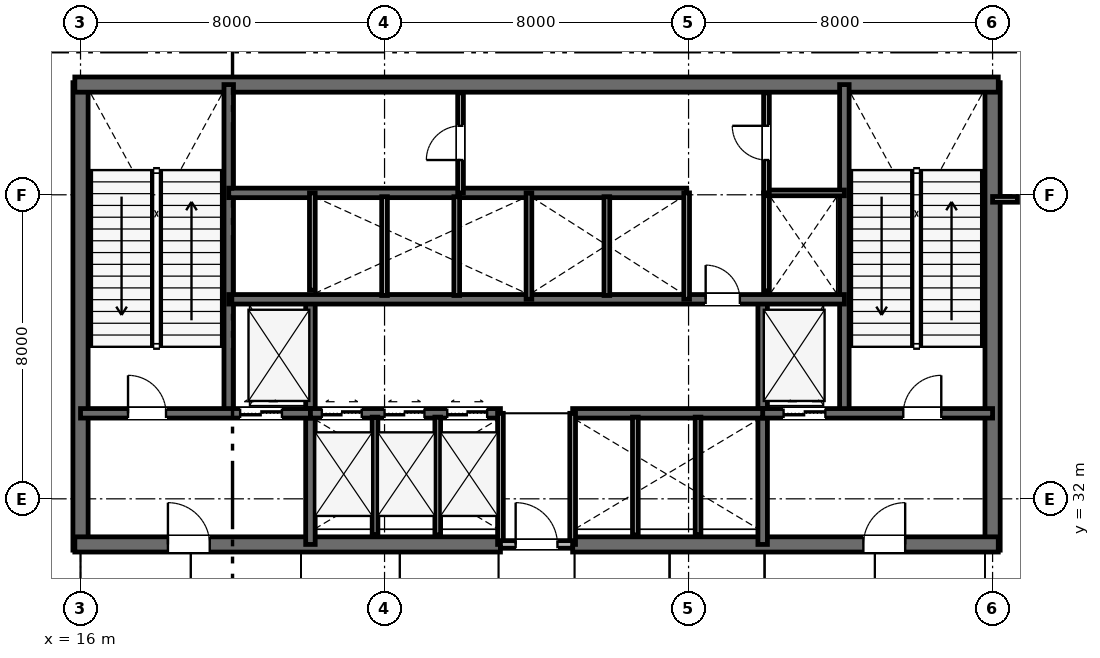
"""IFC4 building model, lengths in metres.
Left out: names, types, materials, properties, quantities, classifications, styles, units other than length and angle.
Written with IfcOpenShell. Run it as: python <this file> out.ifc"""

import sys

from ifc_helpers import new_model, si_unit, direction, frame, frame_2d, origin, place, context, subcontext, project, spatial, rectangle, extrude, element, fill, save


model = new_model("IFC4")
c1 = context("Model", 3, precision=1e-05, world=origin(), true_north=direction((0.0, 1.0)))
c2 = subcontext(c1, "Body", "Model", "MODEL_VIEW")
j1 = project(units=[si_unit("LENGTHUNIT", "METRE"), si_unit("PLANEANGLEUNIT", "RADIAN")], contexts=[c1])
p1 = place(None, origin())
s1 = spatial("IfcSite", under=j1, at=p1, CompositionType="ELEMENT")
p2 = place(p1, origin())
s2 = spatial("IfcBuilding", under=s1, at=p2, CompositionType="ELEMENT")
p3 = place(p2, frame((0.0, 0.0, 6.0)))
s3 = spatial("IfcBuildingStorey", under=s2, at=p3, CompositionType="ELEMENT", Elevation=6.0)
for number, where, z_axis, x_axis in (
    (1, (16.0, 30.65, 0.0), (0.0, 0.0, 1.0), (0.0, 1.0, 0.0)),
    (2, (40.0, 30.65, 0.0), (0.0, 0.0, 1.0), (0.0, 1.0, 0.0)),
):
    element("IfcWall", number, at=place(p3, frame(where, z_axis=z_axis, x_axis=x_axis)), inside=s3, PredefinedType="SHEAR", context=c2, shape_type="SweptSolid", body=[
        extrude(rectangle(XDim=12.3, YDim=0.4, at=frame_2d((6.15, 0.0))), origin(), (0.0, 0.0, 1.0), 5.1),
    ])
p4 = place(p3, frame((15.85, 42.9, 0.0), z_axis=(0.0, 0.0, 1.0), x_axis=(1.0, 0.0, 0.0)))
e3 = element("IfcWall", 3, at=p4, inside=s3, PredefinedType="SHEAR", context=c2, shape_type="SweptSolid", body=[
    extrude(rectangle(XDim=24.3, YDim=0.4, at=frame_2d((12.15, 0.0))), origin(), (0.0, 0.0, 1.0), 5.1),
])
p5 = place(p3, frame((15.85, 30.8, 0.0), z_axis=(0.0, 0.0, 1.0), x_axis=(1.0, 0.0, 0.0)))
e4 = element("IfcWall", 4, at=p5, inside=s3, PredefinedType="SHEAR", context=c2, shape_type="SweptSolid", body=[
    extrude(rectangle(XDim=11.2, YDim=0.4, at=frame_2d((5.6, 0.0))), origin(), (0.0, 0.0, 1.0), 5.1),
])
p6 = place(p5, frame((2.45, 0.0, 0.0)))
e5 = element("IfcOpeningElement", 5, at=p6, cuts=e4, PredefinedType="OPENING", context=c2, shape_type="SweptSolid", body=[
    extrude(rectangle(XDim=1.1, YDim=2.15, at=frame_2d((0.55, 1.075))), frame((0.0, 0.21, 0.0), z_axis=(0.0, -1.0, 0.0), x_axis=(1.0, 0.0, 0.0)), (0.0, 0.0, 1.0), 0.42),
])
p7 = place(p3, frame((28.95, 30.8, 0.0), z_axis=(0.0, 0.0, 1.0), x_axis=(1.0, 0.0, 0.0)))
e6 = element("IfcWall", 6, at=p7, inside=s3, PredefinedType="SHEAR", context=c2, shape_type="SweptSolid", body=[
    extrude(rectangle(XDim=11.2, YDim=0.4, at=frame_2d((5.6, 0.0))), origin(), (0.0, 0.0, 1.0), 5.1),
])
p8 = place(p7, frame((7.65, 0.0, 0.0)))
e7 = element("IfcOpeningElement", 7, at=p8, cuts=e6, PredefinedType="OPENING", context=c2, shape_type="SweptSolid", body=[
    extrude(rectangle(XDim=1.1, YDim=2.15, at=frame_2d((0.55, 1.075))), frame((0.0, 0.21, 0.0), z_axis=(0.0, -1.0, 0.0), x_axis=(1.0, 0.0, 0.0)), (0.0, 0.0, 1.0), 0.42),
])
for number, where, z_axis, x_axis in (
    (8, (19.9, 34.25, 0.0), (0.0, 0.0, 1.0), (0.0, 1.0, 0.0)),
    (9, (36.1, 34.25, 0.0), (0.0, 0.0, 1.0), (0.0, 1.0, 0.0)),
):
    element("IfcWall", number, at=place(p3, frame(where, z_axis=z_axis, x_axis=x_axis)), inside=s3, PredefinedType="SHEAR", context=c2, shape_type="SweptSolid", body=[
        extrude(rectangle(XDim=8.65, YDim=0.25, at=frame_2d((4.325, 0.0))), origin(), (0.0, 0.0, 1.0), 5.1),
    ])
for number, where, z_axis, x_axis in (
    (10, (22.05, 30.8, 0.0), (0.0, 0.0, 1.0), (0.0, 1.0, 0.0)),
    (11, (33.95, 30.8, 0.0), (0.0, 0.0, 1.0), (0.0, 1.0, 0.0)),
):
    element("IfcWall", number, at=place(p3, frame(where, z_axis=z_axis, x_axis=x_axis)), inside=s3, PredefinedType="SHEAR", context=c2, shape_type="SweptSolid", body=[
        extrude(rectangle(XDim=6.45, YDim=0.25, at=frame_2d((3.225, 0.0))), origin(), (0.0, 0.0, 1.0), 5.1),
    ])
p9 = place(p3, frame((16.0, 34.25, 0.0), z_axis=(0.0, 0.0, 1.0), x_axis=(1.0, 0.0, 0.0)))
e12 = element("IfcWall", 12, at=p9, inside=s3, PredefinedType="SHEAR", context=c2, shape_type="SweptSolid", body=[
    extrude(rectangle(XDim=6.05, YDim=0.25, at=frame_2d((3.025, 0.0))), origin(), (0.0, 0.0, 1.0), 5.1),
])
p10 = place(p9, frame((1.25, 0.0, 0.0)))
e13 = element("IfcOpeningElement", 13, at=p10, cuts=e12, PredefinedType="OPENING", context=c2, shape_type="SweptSolid", body=[
    extrude(rectangle(XDim=1.0, YDim=2.15, at=frame_2d((0.5, 1.075))), frame((0.0, 0.135, 0.0), z_axis=(0.0, -1.0, 0.0), x_axis=(1.0, 0.0, 0.0)), (0.0, 0.0, 1.0), 0.27),
])
p11 = place(p9, frame((4.2, 0.0, 0.0)))
e14 = element("IfcOpeningElement", 14, at=p11, cuts=e12, PredefinedType="OPENING", context=c2, shape_type="SweptSolid", body=[
    extrude(rectangle(XDim=1.1, YDim=2.15, at=frame_2d((0.55, 1.075))), frame((0.0, 0.135, 0.0), z_axis=(0.0, -1.0, 0.0), x_axis=(1.0, 0.0, 0.0)), (0.0, 0.0, 1.0), 0.27),
])
p12 = place(p3, frame((33.95, 34.25, 0.0), z_axis=(0.0, 0.0, 1.0), x_axis=(1.0, 0.0, 0.0)))
e15 = element("IfcWall", 15, at=p12, inside=s3, PredefinedType="SHEAR", context=c2, shape_type="SweptSolid", body=[
    extrude(rectangle(XDim=6.05, YDim=0.25, at=frame_2d((3.025, 0.0))), origin(), (0.0, 0.0, 1.0), 5.1),
])
p13 = place(p12, frame((3.7, 0.0, 0.0)))
e16 = element("IfcOpeningElement", 16, at=p13, cuts=e15, PredefinedType="OPENING", context=c2, shape_type="SweptSolid", body=[
    extrude(rectangle(XDim=1.0, YDim=2.15, at=frame_2d((0.5, 1.075))), frame((0.0, 0.135, 0.0), z_axis=(0.0, -1.0, 0.0), x_axis=(1.0, 0.0, 0.0)), (0.0, 0.0, 1.0), 0.27),
])
p14 = place(p12, frame((0.55, 0.0, 0.0)))
e17 = element("IfcOpeningElement", 17, at=p14, cuts=e15, PredefinedType="OPENING", context=c2, shape_type="SweptSolid", body=[
    extrude(rectangle(XDim=1.1, YDim=2.15, at=frame_2d((0.55, 1.075))), frame((0.0, 0.135, 0.0), z_axis=(0.0, -1.0, 0.0), x_axis=(1.0, 0.0, 0.0)), (0.0, 0.0, 1.0), 0.27),
])
p15 = place(p3, frame((22.05, 34.25, 0.0), z_axis=(0.0, 0.0, 1.0), x_axis=(1.0, 0.0, 0.0)))
e18 = element("IfcWall", 18, at=p15, inside=s3, PredefinedType="SHEAR", context=c2, shape_type="SweptSolid", body=[
    extrude(rectangle(XDim=5.0, YDim=0.25, at=frame_2d((2.5, 0.0))), origin(), (0.0, 0.0, 1.0), 5.1),
])
p16 = place(p15, frame((0.3, 0.0, 0.0)))
e19 = element("IfcOpeningElement", 19, at=p16, cuts=e18, PredefinedType="OPENING", context=c2, shape_type="SweptSolid", body=[
    extrude(rectangle(XDim=1.05, YDim=2.15, at=frame_2d((0.525, 1.075))), frame((0.0, 0.135, 0.0), z_axis=(0.0, -1.0, 0.0), x_axis=(1.0, 0.0, 0.0)), (0.0, 0.0, 1.0), 0.27),
])
p17 = place(p15, frame((1.95, 0.0, 0.0)))
e20 = element("IfcOpeningElement", 20, at=p17, cuts=e18, PredefinedType="OPENING", context=c2, shape_type="SweptSolid", body=[
    extrude(rectangle(XDim=1.05, YDim=2.15, at=frame_2d((0.525, 1.075))), frame((0.0, 0.135, 0.0), z_axis=(0.0, -1.0, 0.0), x_axis=(1.0, 0.0, 0.0)), (0.0, 0.0, 1.0), 0.27),
])
p18 = place(p15, frame((3.6, 0.0, 0.0)))
e21 = element("IfcOpeningElement", 21, at=p18, cuts=e18, PredefinedType="OPENING", context=c2, shape_type="SweptSolid", body=[
    extrude(rectangle(XDim=1.05, YDim=2.15, at=frame_2d((0.525, 1.075))), frame((0.0, 0.135, 0.0), z_axis=(0.0, -1.0, 0.0), x_axis=(1.0, 0.0, 0.0)), (0.0, 0.0, 1.0), 0.27),
])
p19 = place(p3, frame((28.95, 34.25, 0.0), z_axis=(0.0, 0.0, 1.0), x_axis=(1.0, 0.0, 0.0)))
e22 = element("IfcWall", 22, at=p19, inside=s3, PredefinedType="SHEAR", context=c2, shape_type="SweptSolid", body=[
    extrude(rectangle(XDim=5.0, YDim=0.25, at=frame_2d((2.5, 0.0))), origin(), (0.0, 0.0, 1.0), 5.1),
])
p20 = place(p3, frame((19.9, 37.25, 0.0), z_axis=(0.0, 0.0, 1.0), x_axis=(1.0, 0.0, 0.0)))
e23 = element("IfcWall", 23, at=p20, inside=s3, PredefinedType="SHEAR", context=c2, shape_type="SweptSolid", body=[
    extrude(rectangle(XDim=16.2, YDim=0.25, at=frame_2d((8.1, 0.0))), origin(), (0.0, 0.0, 1.0), 5.1),
])
p21 = place(p20, frame((12.55, 0.0, 0.0)))
e24 = element("IfcOpeningElement", 24, at=p21, cuts=e23, PredefinedType="OPENING", context=c2, shape_type="SweptSolid", body=[
    extrude(rectangle(XDim=0.9, YDim=2.15, at=frame_2d((0.45, 1.075))), frame((0.0, 0.135, 0.0), z_axis=(0.0, -1.0, 0.0), x_axis=(1.0, 0.0, 0.0)), (0.0, 0.0, 1.0), 0.27),
])
p22 = place(p3, frame((19.9, 40.05, 0.0), z_axis=(0.0, 0.0, 1.0), x_axis=(1.0, 0.0, 0.0)))
e25 = element("IfcWall", 25, at=p22, inside=s3, PredefinedType="SHEAR", context=c2, shape_type="SweptSolid", body=[
    extrude(rectangle(XDim=12.05, YDim=0.25, at=frame_2d((6.025, 0.0))), origin(), (0.0, 0.0, 1.0), 5.1),
])
for number, where, z_axis, x_axis in (
    (26, (27.05, 30.8, 0.0), (0.0, 0.0, 1.0), (0.0, 1.0, 0.0)),
    (27, (28.95, 30.8, 0.0), (0.0, 0.0, 1.0), (0.0, 1.0, 0.0)),
):
    element("IfcWall", number, at=place(p3, frame(where, z_axis=z_axis, x_axis=x_axis)), inside=s3, PredefinedType="PLUMBINGWALL", context=c2, shape_type="SweptSolid", body=[
        extrude(rectangle(XDim=3.45, YDim=0.15, at=frame_2d((1.725, 0.0))), origin(), (0.0, 0.0, 1.0), 4.51),
    ])
p23 = place(p3, frame((27.05, 30.8, 0.0), z_axis=(0.0, 0.0, 1.0), x_axis=(1.0, 0.0, 0.0)))
e28 = element("IfcWall", 28, at=p23, inside=s3, PredefinedType="PARTITIONING", context=c2, shape_type="SweptSolid", body=[
    extrude(rectangle(XDim=1.9, YDim=0.2, at=frame_2d((0.95, 0.0))), origin(), (0.0, 0.0, 1.0), 4.51),
])
p24 = place(p23, frame((0.4, 0.0, 0.0)))
e29 = element("IfcOpeningElement", 29, at=p24, cuts=e28, PredefinedType="OPENING", context=c2, shape_type="SweptSolid", body=[
    extrude(rectangle(XDim=1.1, YDim=2.15, at=frame_2d((0.55, 1.075))), frame((0.0, 0.11, 0.0), z_axis=(0.0, -1.0, 0.0), x_axis=(1.0, 0.0, 0.0)), (0.0, 0.0, 1.0), 0.22),
])
for number, where, z_axis, x_axis in (
    (30, (23.75, 31.05, 0.0), (0.0, 0.0, 1.0), (0.0, 1.0, 0.0)),
    (31, (25.4, 31.05, 0.0), (0.0, 0.0, 1.0), (0.0, 1.0, 0.0)),
    (32, (30.6, 31.05, 0.0), (0.0, 0.0, 1.0), (0.0, 1.0, 0.0)),
    (33, (32.25, 31.05, 0.0), (0.0, 0.0, 1.0), (0.0, 1.0, 0.0)),
):
    element("IfcWall", number, at=place(p3, frame(where, z_axis=z_axis, x_axis=x_axis)), inside=s3, PredefinedType="PLUMBINGWALL", context=c2, shape_type="SweptSolid", body=[
        extrude(rectangle(XDim=3.1, YDim=0.15, at=frame_2d((1.55, 0.0))), origin(), (0.0, 0.0, 1.0), 4.77),
    ])
p25 = place(p3, frame((22.1, 37.49, 0.0), z_axis=(0.0, 0.0, 1.0), x_axis=(0.0, 1.0, 0.0)))
e34 = element("IfcWall", 34, at=p25, inside=s3, PredefinedType="PLUMBINGWALL", context=c2, shape_type="SweptSolid", body=[
    extrude(rectangle(XDim=2.56, YDim=0.15, at=frame_2d((1.28, 0.0))), origin(), (0.0, 0.0, 1.0), 4.77),
])
p26 = place(p3, frame((27.8, 37.25, 0.0), z_axis=(0.0, 0.0, 1.0), x_axis=(0.0, 1.0, 0.0)))
e35 = element("IfcWall", 35, at=p26, inside=s3, PredefinedType="PLUMBINGWALL", context=c2, shape_type="SweptSolid", body=[
    extrude(rectangle(XDim=2.8, YDim=0.15, at=frame_2d((1.4, 0.0))), origin(), (0.0, 0.0, 1.0), 4.77),
])
for number, where, z_axis, x_axis in (
    (36, (24.0, 37.35, 0.0), (0.0, 0.0, 1.0), (0.0, 1.0, 0.0)),
    (37, (25.9, 37.35, 0.0), (0.0, 0.0, 1.0), (0.0, 1.0, 0.0)),
):
    element("IfcWall", number, at=place(p3, frame(where, z_axis=z_axis, x_axis=x_axis)), inside=s3, PredefinedType="PLUMBINGWALL", context=c2, shape_type="SweptSolid", body=[
        extrude(rectangle(XDim=2.6, YDim=0.15, at=frame_2d((1.3, 0.0))), origin(), (0.0, 0.0, 1.0), 4.77),
    ])
p27 = place(p3, frame((31.95, 37.25, 0.0), z_axis=(0.0, 0.0, 1.0), x_axis=(0.0, 1.0, 0.0)))
e38 = element("IfcWall", 38, at=p27, inside=s3, PredefinedType="PLUMBINGWALL", context=c2, shape_type="SweptSolid", body=[
    extrude(rectangle(XDim=2.8, YDim=0.15, at=frame_2d((1.4, 0.0))), origin(), (0.0, 0.0, 1.0), 4.77),
])
p28 = place(p3, frame((29.85, 37.35, 0.0), z_axis=(0.0, 0.0, 1.0), x_axis=(0.0, 1.0, 0.0)))
e39 = element("IfcWall", 39, at=p28, inside=s3, PredefinedType="PLUMBINGWALL", context=c2, shape_type="SweptSolid", body=[
    extrude(rectangle(XDim=2.6, YDim=0.15, at=frame_2d((1.3, 0.0))), origin(), (0.0, 0.0, 1.0), 4.77),
])
p29 = place(p3, frame((34.05, 37.473, 0.0), z_axis=(0.0, 0.0, 1.0), x_axis=(0.0, 1.0, 0.0)))
e40 = element("IfcWall", 40, at=p29, inside=s3, PredefinedType="PLUMBINGWALL", context=c2, shape_type="SweptSolid", body=[
    extrude(rectangle(XDim=2.577, YDim=0.15, at=frame_2d((1.288, 0.0))), origin(), (0.0, 0.0, 1.0), 4.77),
])
p30 = place(p3, frame((34.05, 40.05, 0.0), z_axis=(0.0, 0.0, 1.0), x_axis=(1.0, 0.0, 0.0)))
e41 = element("IfcWall", 41, at=p30, inside=s3, PredefinedType="PARTITIONING", context=c2, shape_type="SweptSolid", body=[
    extrude(rectangle(XDim=2.05, YDim=0.15, at=frame_2d((1.025, 0.0))), origin(), (0.0, 0.0, 1.0), 4.77),
])
p31 = place(p3, frame((34.05, 40.05, 0.0), z_axis=(0.0, 0.0, 1.0), x_axis=(0.0, 1.0, 0.0)))
e42 = element("IfcWall", 42, at=p31, inside=s3, PredefinedType="PARTITIONING", context=c2, shape_type="SweptSolid", body=[
    extrude(rectangle(XDim=2.63, YDim=0.15, at=frame_2d((1.315, 0.0))), origin(), (0.0, 0.0, 1.0), 4.77),
])
p32 = place(p31, frame((0.865, 0.0, 0.0)))
e43 = element("IfcOpeningElement", 43, at=p32, cuts=e42, PredefinedType="OPENING", context=c2, shape_type="SweptSolid", body=[
    extrude(rectangle(XDim=0.9, YDim=2.15, at=frame_2d((0.45, 1.075))), frame((0.0, 0.085, 0.0), z_axis=(0.0, -1.0, 0.0), x_axis=(1.0, 0.0, 0.0)), (0.0, 0.0, 1.0), 0.17),
])
p33 = place(p3, frame((26.0, 40.05, 0.0), z_axis=(0.0, 0.0, 1.0), x_axis=(0.0, 1.0, 0.0)))
e44 = element("IfcWall", 44, at=p33, inside=s3, PredefinedType="PARTITIONING", context=c2, shape_type="SweptSolid", body=[
    extrude(rectangle(XDim=2.63, YDim=0.15, at=frame_2d((1.315, 0.0))), origin(), (0.0, 0.0, 1.0), 4.77),
])
p34 = place(p33, frame((0.865, 0.0, 0.0)))
e45 = element("IfcOpeningElement", 45, at=p34, cuts=e44, PredefinedType="OPENING", context=c2, shape_type="SweptSolid", body=[
    extrude(rectangle(XDim=0.9, YDim=2.15, at=frame_2d((0.45, 1.075))), frame((0.0, 0.085, 0.0), z_axis=(0.0, -1.0, 0.0), x_axis=(1.0, 0.0, 0.0)), (0.0, 0.0, 1.0), 0.17),
])
p35 = place(p3, frame((40.0, 39.88, 0.0), z_axis=(0.0, 0.0, 1.0), x_axis=(1.0, 0.0, 0.0)))
e46 = element("IfcWall", 46, at=p35, inside=s3, PredefinedType="PARTITIONING", context=c2, shape_type="SweptSolid", body=[
    extrude(rectangle(XDim=0.655, YDim=0.15, at=frame_2d((0.328, 0.0))), origin(), (0.0, 0.0, 1.0), 4.77),
])
p36 = place(p24, origin())
e47 = element("IfcDoor", 47, at=p36, inside=s3, OperationType="SINGLE_SWING_LEFT", PredefinedType="DOOR", context=c2, shape_type="SweptSolid", body=[
    extrude(rectangle(XDim=1.1, YDim=2.15, at=frame_2d((0.55, 1.075))), frame((0.0, 0.025, 0.0), z_axis=(0.0, -1.0, 0.0), x_axis=(1.0, 0.0, 0.0)), (0.0, 0.0, 1.0), 0.05),
])
fill(e29, e47)
p37 = place(p10, origin())
e48 = element("IfcDoor", 48, at=p37, inside=s3, OperationType="SINGLE_SWING_LEFT", PredefinedType="DOOR", context=c2, shape_type="SweptSolid", body=[
    extrude(rectangle(XDim=1.0, YDim=2.15, at=frame_2d((0.5, 1.075))), frame((0.0, 0.025, 0.0), z_axis=(0.0, -1.0, 0.0), x_axis=(1.0, 0.0, 0.0)), (0.0, 0.0, 1.0), 0.05),
])
fill(e13, e48)
p38 = place(p13, origin())
e49 = element("IfcDoor", 49, at=p38, inside=s3, OperationType="SINGLE_SWING_RIGHT", PredefinedType="DOOR", context=c2, shape_type="SweptSolid", body=[
    extrude(rectangle(XDim=1.0, YDim=2.15, at=frame_2d((0.5, 1.075))), frame((0.0, 0.025, 0.0), z_axis=(0.0, -1.0, 0.0), x_axis=(1.0, 0.0, 0.0)), (0.0, 0.0, 1.0), 0.05),
])
fill(e16, e49)
p39 = place(p6, origin())
e50 = element("IfcDoor", 50, at=p39, inside=s3, OperationType="SINGLE_SWING_LEFT", PredefinedType="DOOR", context=c2, shape_type="SweptSolid", body=[
    extrude(rectangle(XDim=1.1, YDim=2.15, at=frame_2d((0.55, 1.075))), frame((0.0, 0.025, 0.0), z_axis=(0.0, -1.0, 0.0), x_axis=(1.0, 0.0, 0.0)), (0.0, 0.0, 1.0), 0.05),
])
fill(e5, e50)
p40 = place(p8, origin())
e51 = element("IfcDoor", 51, at=p40, inside=s3, OperationType="SINGLE_SWING_RIGHT", PredefinedType="DOOR", context=c2, shape_type="SweptSolid", body=[
    extrude(rectangle(XDim=1.1, YDim=2.15, at=frame_2d((0.55, 1.075))), frame((0.0, 0.025, 0.0), z_axis=(0.0, -1.0, 0.0), x_axis=(1.0, 0.0, 0.0)), (0.0, 0.0, 1.0), 0.05),
])
fill(e7, e51)
p41 = place(p21, origin())
e52 = element("IfcDoor", 52, at=p41, inside=s3, OperationType="SINGLE_SWING_LEFT", PredefinedType="DOOR", context=c2, shape_type="SweptSolid", body=[
    extrude(rectangle(XDim=0.9, YDim=2.15, at=frame_2d((0.45, 1.075))), frame((0.0, 0.025, 0.0), z_axis=(0.0, -1.0, 0.0), x_axis=(1.0, 0.0, 0.0)), (0.0, 0.0, 1.0), 0.05),
])
fill(e24, e52)
p42 = place(p32, origin())
e53 = element("IfcDoor", 53, at=p42, inside=s3, OperationType="SINGLE_SWING_RIGHT", PredefinedType="DOOR", context=c2, shape_type="SweptSolid", body=[
    extrude(rectangle(XDim=0.9, YDim=2.15, at=frame_2d((0.45, 1.075))), frame((0.0, 0.025, 0.0), z_axis=(0.0, -1.0, 0.0), x_axis=(1.0, 0.0, 0.0)), (0.0, 0.0, 1.0), 0.05),
])
fill(e43, e53)
p43 = place(p34, origin())
e54 = element("IfcDoor", 54, at=p43, inside=s3, OperationType="SINGLE_SWING_LEFT", PredefinedType="DOOR", context=c2, shape_type="SweptSolid", body=[
    extrude(rectangle(XDim=0.9, YDim=2.15, at=frame_2d((0.45, 1.075))), frame((0.0, 0.025, 0.0), z_axis=(0.0, -1.0, 0.0), x_axis=(1.0, 0.0, 0.0)), (0.0, 0.0, 1.0), 0.05),
])
fill(e45, e54)
p44 = place(p11, origin())
e55 = element("IfcDoor", 55, at=p44, inside=s3, OperationType="DOUBLE_DOOR_SLIDING", PredefinedType="DOOR", context=c2, shape_type="SweptSolid", body=[
    extrude(rectangle(XDim=1.1, YDim=2.15, at=frame_2d((0.55, 1.075))), frame((0.0, 0.025, 0.0), z_axis=(0.0, -1.0, 0.0), x_axis=(1.0, 0.0, 0.0)), (0.0, 0.0, 1.0), 0.05),
])
fill(e14, e55)
p45 = place(p14, origin())
e56 = element("IfcDoor", 56, at=p45, inside=s3, OperationType="DOUBLE_DOOR_SLIDING", PredefinedType="DOOR", context=c2, shape_type="SweptSolid", body=[
    extrude(rectangle(XDim=1.1, YDim=2.15, at=frame_2d((0.55, 1.075))), frame((0.0, 0.025, 0.0), z_axis=(0.0, -1.0, 0.0), x_axis=(1.0, 0.0, 0.0)), (0.0, 0.0, 1.0), 0.05),
])
fill(e17, e56)
p46 = place(p16, origin())
e57 = element("IfcDoor", 57, at=p46, inside=s3, OperationType="DOUBLE_DOOR_SLIDING", PredefinedType="DOOR", context=c2, shape_type="SweptSolid", body=[
    extrude(rectangle(XDim=1.05, YDim=2.15, at=frame_2d((0.525, 1.075))), frame((0.0, 0.025, 0.0), z_axis=(0.0, -1.0, 0.0), x_axis=(1.0, 0.0, 0.0)), (0.0, 0.0, 1.0), 0.05),
])
fill(e19, e57)
p47 = place(p17, origin())
e58 = element("IfcDoor", 58, at=p47, inside=s3, OperationType="DOUBLE_DOOR_SLIDING", PredefinedType="DOOR", context=c2, shape_type="SweptSolid", body=[
    extrude(rectangle(XDim=1.05, YDim=2.15, at=frame_2d((0.525, 1.075))), frame((0.0, 0.025, 0.0), z_axis=(0.0, -1.0, 0.0), x_axis=(1.0, 0.0, 0.0)), (0.0, 0.0, 1.0), 0.05),
])
fill(e20, e58)
p48 = place(p18, origin())
e59 = element("IfcDoor", 59, at=p48, inside=s3, OperationType="DOUBLE_DOOR_SLIDING", PredefinedType="DOOR", context=c2, shape_type="SweptSolid", body=[
    extrude(rectangle(XDim=1.05, YDim=2.15, at=frame_2d((0.525, 1.075))), frame((0.0, 0.025, 0.0), z_axis=(0.0, -1.0, 0.0), x_axis=(1.0, 0.0, 0.0)), (0.0, 0.0, 1.0), 0.05),
])
fill(e21, e59)
save(model, sys.argv[1])
